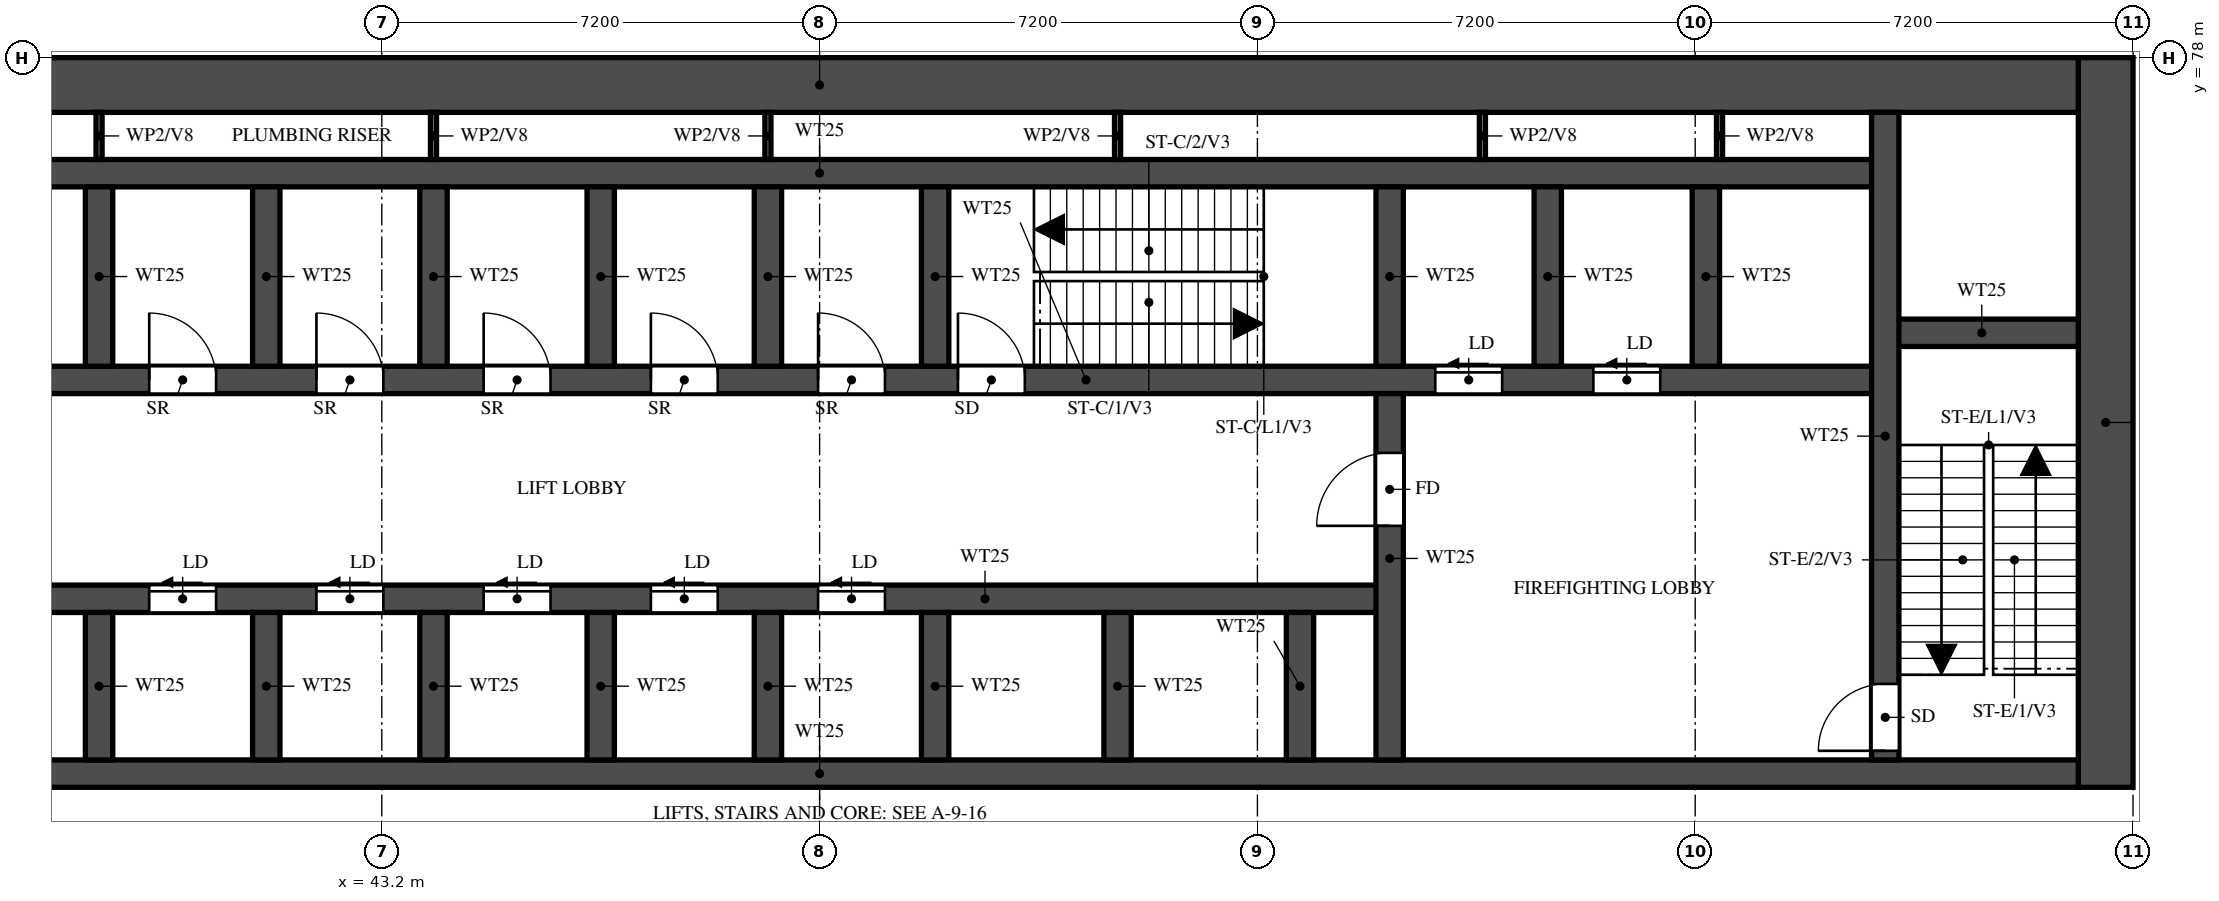
"""IFC4 building model, lengths in metres.
Left out: names, types, materials, properties, quantities, classifications, styles, units other than length and angle.
Written with IfcOpenShell. Run it as: python <this file> out.ifc"""

import sys

from ifc_helpers import new_model, si_unit, direction, frame, frame_2d, origin, place, context, subcontext, project, spatial, rectangle, extrude, element, fill, save


model = new_model("IFC4")
c1 = context("Model", 3, precision=1e-05, world=origin(), true_north=direction((0.0, 1.0)))
c2 = subcontext(c1, "Body", "Model", "MODEL_VIEW")
j1 = project(units=[si_unit("LENGTHUNIT", "METRE"), si_unit("PLANEANGLEUNIT", "RADIAN")], contexts=[c1])
p1 = place(None, origin())
s1 = spatial("IfcSite", under=j1, at=p1, CompositionType="ELEMENT")
p2 = place(p1, origin())
s2 = spatial("IfcBuilding", under=s1, at=p2, CompositionType="ELEMENT")
p3 = place(p2, frame((0.0, 0.0, 107.5)))
s3 = spatial("IfcBuildingStorey", under=s2, at=p3, CompositionType="ELEMENT", Elevation=107.5)
p4 = place(p3, frame((71.55, 66.0, 0.0), z_axis=(0.0, 0.0, 1.0), x_axis=(0.0, 1.0, 0.0)))
e1 = element("IfcWall", 1, at=p4, inside=s3, PredefinedType="SHEAR", context=c2, shape_type="SweptSolid", body=[
    extrude(rectangle(XDim=12.0, YDim=0.9, at=frame_2d((6.0, 0.0))), origin(), (0.0, 0.0, 1.0), 5.2),
])
p5 = place(p3, frame((29.7, 77.55, 0.0), z_axis=(0.0, 0.0, 1.0), x_axis=(1.0, 0.0, 0.0)))
e2 = element("IfcWall", 2, at=p5, inside=s3, PredefinedType="SHEAR", context=c2, shape_type="SweptSolid", body=[
    extrude(rectangle(XDim=41.4, YDim=0.9, at=frame_2d((20.7, 0.0))), origin(), (0.0, 0.0, 1.0), 5.2),
])
p6 = place(p3, frame((29.7, 66.225, 0.0), z_axis=(0.0, 0.0, 1.0), x_axis=(1.0, 0.0, 0.0)))
e3 = element("IfcWall", 3, at=p6, inside=s3, PredefinedType="SHEAR", context=c2, shape_type="SweptSolid", body=[
    extrude(rectangle(XDim=41.4, YDim=0.45, at=frame_2d((20.7, 0.0))), origin(), (0.0, 0.0, 1.0), 5.2),
])
p7 = place(p6, frame((0.925, 0.0, 0.0)))
e4 = element("IfcOpeningElement", 4, at=p7, cuts=e3, PredefinedType="OPENING", context=c2, shape_type="SweptSolid", body=[
    extrude(rectangle(XDim=1.1, YDim=2.1, at=frame_2d((0.55, 1.05))), frame((0.0, 0.235, 0.0), z_axis=(0.0, -1.0, 0.0), x_axis=(1.0, 0.0, 0.0)), (0.0, 0.0, 1.0), 0.47),
])
p8 = place(p6, frame((3.738, 0.0, 0.0)))
e5 = element("IfcOpeningElement", 5, at=p8, cuts=e3, PredefinedType="OPENING", context=c2, shape_type="SweptSolid", body=[
    extrude(rectangle(XDim=1.8, YDim=2.1, at=frame_2d((0.9, 1.05))), frame((0.0, 0.235, 0.0), z_axis=(0.0, -1.0, 0.0), x_axis=(1.0, 0.0, 0.0)), (0.0, 0.0, 1.0), 0.47),
])
p9 = place(p3, frame((35.575, 69.1, 0.0), z_axis=(0.0, 0.0, 1.0), x_axis=(1.0, 0.0, 0.0)))
e6 = element("IfcWall", 6, at=p9, inside=s3, PredefinedType="SHEAR", context=c2, shape_type="SweptSolid", body=[
    extrude(rectangle(XDim=24.2, YDim=0.45, at=frame_2d((12.1, 0.0))), origin(), (0.0, 0.0, 1.0), 5.2),
])
p10 = place(p9, frame((1.05, 0.0, 0.0)))
e7 = element("IfcOpeningElement", 7, at=p10, cuts=e6, PredefinedType="OPENING", context=c2, shape_type="SweptSolid", body=[
    extrude(rectangle(XDim=1.1, YDim=2.1, at=frame_2d((0.55, 1.05))), frame((0.0, 0.235, 0.0), z_axis=(0.0, -1.0, 0.0), x_axis=(1.0, 0.0, 0.0)), (0.0, 0.0, 1.0), 0.47),
])
p11 = place(p9, frame((3.8, 0.0, 0.0)))
e8 = element("IfcOpeningElement", 8, at=p11, cuts=e6, PredefinedType="OPENING", context=c2, shape_type="SweptSolid", body=[
    extrude(rectangle(XDim=1.1, YDim=2.1, at=frame_2d((0.55, 1.05))), frame((0.0, 0.235, 0.0), z_axis=(0.0, -1.0, 0.0), x_axis=(1.0, 0.0, 0.0)), (0.0, 0.0, 1.0), 0.47),
])
p12 = place(p9, frame((6.55, 0.0, 0.0)))
e9 = element("IfcOpeningElement", 9, at=p12, cuts=e6, PredefinedType="OPENING", context=c2, shape_type="SweptSolid", body=[
    extrude(rectangle(XDim=1.1, YDim=2.1, at=frame_2d((0.55, 1.05))), frame((0.0, 0.235, 0.0), z_axis=(0.0, -1.0, 0.0), x_axis=(1.0, 0.0, 0.0)), (0.0, 0.0, 1.0), 0.47),
])
p13 = place(p9, frame((9.3, 0.0, 0.0)))
e10 = element("IfcOpeningElement", 10, at=p13, cuts=e6, PredefinedType="OPENING", context=c2, shape_type="SweptSolid", body=[
    extrude(rectangle(XDim=1.1, YDim=2.1, at=frame_2d((0.55, 1.05))), frame((0.0, 0.235, 0.0), z_axis=(0.0, -1.0, 0.0), x_axis=(1.0, 0.0, 0.0)), (0.0, 0.0, 1.0), 0.47),
])
p14 = place(p9, frame((12.05, 0.0, 0.0)))
e11 = element("IfcOpeningElement", 11, at=p14, cuts=e6, PredefinedType="OPENING", context=c2, shape_type="SweptSolid", body=[
    extrude(rectangle(XDim=1.1, YDim=2.1, at=frame_2d((0.55, 1.05))), frame((0.0, 0.235, 0.0), z_axis=(0.0, -1.0, 0.0), x_axis=(1.0, 0.0, 0.0)), (0.0, 0.0, 1.0), 0.47),
])
p15 = place(p9, frame((14.8, 0.0, 0.0)))
e12 = element("IfcOpeningElement", 12, at=p15, cuts=e6, PredefinedType="OPENING", context=c2, shape_type="SweptSolid", body=[
    extrude(rectangle(XDim=1.1, YDim=2.1, at=frame_2d((0.55, 1.05))), frame((0.0, 0.235, 0.0), z_axis=(0.0, -1.0, 0.0), x_axis=(1.0, 0.0, 0.0)), (0.0, 0.0, 1.0), 0.47),
])
p16 = place(p3, frame((32.875, 72.7, 0.0), z_axis=(0.0, 0.0, 1.0), x_axis=(1.0, 0.0, 0.0)))
e13 = element("IfcWall", 13, at=p16, inside=s3, PredefinedType="SHEAR", context=c2, shape_type="SweptSolid", body=[
    extrude(rectangle(XDim=35.05, YDim=0.45, at=frame_2d((17.525, 0.0))), origin(), (0.0, 0.0, 1.0), 5.2),
])
p17 = place(p16, frame((19.8, 0.0, 0.0)))
e14 = element("IfcOpeningElement", 14, at=p17, cuts=e13, PredefinedType="OPENING", context=c2, shape_type="SweptSolid", body=[
    extrude(rectangle(XDim=1.1, YDim=2.1, at=frame_2d((0.55, 1.05))), frame((0.0, 0.235, 0.0), z_axis=(0.0, -1.0, 0.0), x_axis=(1.0, 0.0, 0.0)), (0.0, 0.0, 1.0), 0.47),
])
p18 = place(p16, frame((27.65, 0.0, 0.0)))
e15 = element("IfcOpeningElement", 15, at=p18, cuts=e13, PredefinedType="OPENING", context=c2, shape_type="SweptSolid", body=[
    extrude(rectangle(XDim=1.1, YDim=2.1, at=frame_2d((0.55, 1.05))), frame((0.0, 0.235, 0.0), z_axis=(0.0, -1.0, 0.0), x_axis=(1.0, 0.0, 0.0)), (0.0, 0.0, 1.0), 0.47),
])
p19 = place(p16, frame((30.25, 0.0, 0.0)))
e16 = element("IfcOpeningElement", 16, at=p19, cuts=e13, PredefinedType="OPENING", context=c2, shape_type="SweptSolid", body=[
    extrude(rectangle(XDim=1.1, YDim=2.1, at=frame_2d((0.55, 1.05))), frame((0.0, 0.235, 0.0), z_axis=(0.0, -1.0, 0.0), x_axis=(1.0, 0.0, 0.0)), (0.0, 0.0, 1.0), 0.47),
])
p20 = place(p16, frame((3.75, 0.0, 0.0)))
e17 = element("IfcOpeningElement", 17, at=p20, cuts=e13, PredefinedType="OPENING", context=c2, shape_type="SweptSolid", body=[
    extrude(rectangle(XDim=1.1, YDim=2.1, at=frame_2d((0.55, 1.05))), frame((0.0, 0.235, 0.0), z_axis=(0.0, -1.0, 0.0), x_axis=(1.0, 0.0, 0.0)), (0.0, 0.0, 1.0), 0.47),
])
p21 = place(p16, frame((6.5, 0.0, 0.0)))
e18 = element("IfcOpeningElement", 18, at=p21, cuts=e13, PredefinedType="OPENING", context=c2, shape_type="SweptSolid", body=[
    extrude(rectangle(XDim=1.1, YDim=2.1, at=frame_2d((0.55, 1.05))), frame((0.0, 0.235, 0.0), z_axis=(0.0, -1.0, 0.0), x_axis=(1.0, 0.0, 0.0)), (0.0, 0.0, 1.0), 0.47),
])
p22 = place(p16, frame((9.25, 0.0, 0.0)))
e19 = element("IfcOpeningElement", 19, at=p22, cuts=e13, PredefinedType="OPENING", context=c2, shape_type="SweptSolid", body=[
    extrude(rectangle(XDim=1.1, YDim=2.1, at=frame_2d((0.55, 1.05))), frame((0.0, 0.235, 0.0), z_axis=(0.0, -1.0, 0.0), x_axis=(1.0, 0.0, 0.0)), (0.0, 0.0, 1.0), 0.47),
])
p23 = place(p16, frame((12.0, 0.0, 0.0)))
e20 = element("IfcOpeningElement", 20, at=p23, cuts=e13, PredefinedType="OPENING", context=c2, shape_type="SweptSolid", body=[
    extrude(rectangle(XDim=1.1, YDim=2.1, at=frame_2d((0.55, 1.05))), frame((0.0, 0.235, 0.0), z_axis=(0.0, -1.0, 0.0), x_axis=(1.0, 0.0, 0.0)), (0.0, 0.0, 1.0), 0.47),
])
p24 = place(p16, frame((14.75, 0.0, 0.0)))
e21 = element("IfcOpeningElement", 21, at=p24, cuts=e13, PredefinedType="OPENING", context=c2, shape_type="SweptSolid", body=[
    extrude(rectangle(XDim=1.1, YDim=2.1, at=frame_2d((0.55, 1.05))), frame((0.0, 0.235, 0.0), z_axis=(0.0, -1.0, 0.0), x_axis=(1.0, 0.0, 0.0)), (0.0, 0.0, 1.0), 0.47),
])
p25 = place(p16, frame((17.5, 0.0, 0.0)))
e22 = element("IfcOpeningElement", 22, at=p25, cuts=e13, PredefinedType="OPENING", context=c2, shape_type="SweptSolid", body=[
    extrude(rectangle(XDim=1.1, YDim=2.1, at=frame_2d((0.55, 1.05))), frame((0.0, 0.235, 0.0), z_axis=(0.0, -1.0, 0.0), x_axis=(1.0, 0.0, 0.0)), (0.0, 0.0, 1.0), 0.47),
])
p26 = place(p16, frame((0.913, 0.0, 0.0)))
e23 = element("IfcOpeningElement", 23, at=p26, cuts=e13, PredefinedType="OPENING", context=c2, shape_type="SweptSolid", body=[
    extrude(rectangle(XDim=1.1, YDim=2.1, at=frame_2d((0.55, 1.05))), frame((0.0, 0.235, 0.0), z_axis=(0.0, -1.0, 0.0), x_axis=(1.0, 0.0, 0.0)), (0.0, 0.0, 1.0), 0.47),
])
p27 = place(p3, frame((32.875, 76.1, 0.0), z_axis=(0.0, 0.0, 1.0), x_axis=(1.0, 0.0, 0.0)))
e24 = element("IfcWall", 24, at=p27, inside=s3, PredefinedType="SHEAR", context=c2, shape_type="SweptSolid", body=[
    extrude(rectangle(XDim=35.05, YDim=0.45, at=frame_2d((17.525, 0.0))), origin(), (0.0, 0.0, 1.0), 5.2),
])
p28 = place(p3, frame((67.925, 73.475, 0.0), z_axis=(0.0, 0.0, 1.0), x_axis=(1.0, 0.0, 0.0)))
e25 = element("IfcWall", 25, at=p28, inside=s3, PredefinedType="SHEAR", context=c2, shape_type="SweptSolid", body=[
    extrude(rectangle(XDim=3.175, YDim=0.45, at=frame_2d((1.587, 0.0))), origin(), (0.0, 0.0, 1.0), 5.2),
])
p29 = place(p3, frame((67.925, 66.45, 0.0), z_axis=(0.0, 0.0, 1.0), x_axis=(0.0, 1.0, 0.0)))
e26 = element("IfcWall", 26, at=p29, inside=s3, PredefinedType="SHEAR", context=c2, shape_type="SweptSolid", body=[
    extrude(rectangle(XDim=10.65, YDim=0.45, at=frame_2d((5.325, 0.0))), origin(), (0.0, 0.0, 1.0), 5.2),
])
p30 = place(p29, frame((0.15, 0.0, 0.0)))
e27 = element("IfcOpeningElement", 27, at=p30, cuts=e26, PredefinedType="OPENING", context=c2, shape_type="SweptSolid", body=[
    extrude(rectangle(XDim=1.1, YDim=2.1, at=frame_2d((0.55, 1.05))), frame((0.0, 0.235, 0.0), z_axis=(0.0, -1.0, 0.0), x_axis=(1.0, 0.0, 0.0)), (0.0, 0.0, 1.0), 0.47),
])
p31 = place(p3, frame((59.775, 66.45, 0.0), z_axis=(0.0, 0.0, 1.0), x_axis=(0.0, 1.0, 0.0)))
e28 = element("IfcWall", 28, at=p31, inside=s3, PredefinedType="SHEAR", context=c2, shape_type="SweptSolid", body=[
    extrude(rectangle(XDim=6.025, YDim=0.45, at=frame_2d((3.013, 0.0))), origin(), (0.0, 0.0, 1.0), 5.2),
])
p32 = place(p31, frame((3.85, 0.0, 0.0)))
e29 = element("IfcOpeningElement", 29, at=p32, cuts=e28, PredefinedType="OPENING", context=c2, shape_type="SweptSolid", body=[
    extrude(rectangle(XDim=1.2, YDim=2.1, at=frame_2d((0.6, 1.05))), frame((0.0, 0.235, 0.0), z_axis=(0.0, -1.0, 0.0), x_axis=(1.0, 0.0, 0.0)), (0.0, 0.0, 1.0), 0.47),
])
p33 = place(p3, frame((59.775, 72.925, 0.0), z_axis=(0.0, 0.0, 1.0), x_axis=(0.0, 1.0, 0.0)))
e30 = element("IfcWall", 30, at=p33, inside=s3, PredefinedType="SHEAR", context=c2, shape_type="SweptSolid", body=[
    extrude(rectangle(XDim=2.95, YDim=0.45, at=frame_2d((1.475, 0.0))), origin(), (0.0, 0.0, 1.0), 5.2),
])
for number, where, z_axis, x_axis in (
    (31, (38.55, 66.45, 0.0), (0.0, 0.0, 1.0), (0.0, 1.0, 0.0)),
    (32, (41.3, 66.45, 0.0), (0.0, 0.0, 1.0), (0.0, 1.0, 0.0)),
    (33, (44.05, 66.45, 0.0), (0.0, 0.0, 1.0), (0.0, 1.0, 0.0)),
    (34, (46.8, 66.45, 0.0), (0.0, 0.0, 1.0), (0.0, 1.0, 0.0)),
    (35, (49.55, 66.45, 0.0), (0.0, 0.0, 1.0), (0.0, 1.0, 0.0)),
    (36, (52.3, 66.45, 0.0), (0.0, 0.0, 1.0), (0.0, 1.0, 0.0)),
    (37, (55.3, 66.45, 0.0), (0.0, 0.0, 1.0), (0.0, 1.0, 0.0)),
    (38, (58.3, 66.45, 0.0), (0.0, 0.0, 1.0), (0.0, 1.0, 0.0)),
):
    element("IfcWall", number, at=place(p3, frame(where, z_axis=z_axis, x_axis=x_axis)), inside=s3, PredefinedType="SHEAR", context=c2, shape_type="SweptSolid", body=[
        extrude(rectangle(XDim=2.425, YDim=0.45, at=frame_2d((1.212, 0.0))), origin(), (0.0, 0.0, 1.0), 5.2),
    ])
for number, where, z_axis, x_axis in (
    (39, (38.55, 72.925, 0.0), (0.0, 0.0, 1.0), (0.0, 1.0, 0.0)),
    (40, (41.3, 72.925, 0.0), (0.0, 0.0, 1.0), (0.0, 1.0, 0.0)),
    (41, (44.05, 72.925, 0.0), (0.0, 0.0, 1.0), (0.0, 1.0, 0.0)),
    (42, (46.8, 72.925, 0.0), (0.0, 0.0, 1.0), (0.0, 1.0, 0.0)),
    (43, (49.55, 72.925, 0.0), (0.0, 0.0, 1.0), (0.0, 1.0, 0.0)),
    (44, (52.3, 72.925, 0.0), (0.0, 0.0, 1.0), (0.0, 1.0, 0.0)),
    (45, (62.375, 72.925, 0.0), (0.0, 0.0, 1.0), (0.0, 1.0, 0.0)),
    (46, (64.975, 72.925, 0.0), (0.0, 0.0, 1.0), (0.0, 1.0, 0.0)),
):
    element("IfcWall", number, at=place(p3, frame(where, z_axis=z_axis, x_axis=x_axis)), inside=s3, PredefinedType="SHEAR", context=c2, shape_type="SweptSolid", body=[
        extrude(rectangle(XDim=2.95, YDim=0.45, at=frame_2d((1.475, 0.0))), origin(), (0.0, 0.0, 1.0), 5.2),
    ])
for number, where, z_axis, x_axis in (
    (47, (38.55, 76.325, 0.0), (0.0, 0.0, 1.0), (0.0, 1.0, 0.0)),
    (48, (44.05, 76.325, 0.0), (0.0, 0.0, 1.0), (0.0, 1.0, 0.0)),
    (49, (49.55, 76.325, 0.0), (0.0, 0.0, 1.0), (0.0, 1.0, 0.0)),
    (50, (55.3, 76.325, 0.0), (0.0, 0.0, 1.0), (0.0, 1.0, 0.0)),
    (51, (61.3, 76.325, 0.0), (0.0, 0.0, 1.0), (0.0, 1.0, 0.0)),
    (52, (65.2, 76.325, 0.0), (0.0, 0.0, 1.0), (0.0, 1.0, 0.0)),
):
    element("IfcWall", number, at=place(p3, frame(where, z_axis=z_axis, x_axis=x_axis)), inside=s3, PredefinedType="PARTITIONING", context=c2, shape_type="SweptSolid", body=[
        extrude(rectangle(XDim=0.775, YDim=0.1, at=frame_2d((0.388, 0.0))), origin(), (0.0, 0.0, 1.0), 5.2),
    ])
p34 = place(p17, origin())
e53 = element("IfcDoor", 53, at=p34, inside=s3, OperationType="SINGLE_SWING_LEFT", PredefinedType="DOOR", context=c2, shape_type="SweptSolid", body=[
    extrude(rectangle(XDim=1.1, YDim=2.1, at=frame_2d((0.55, 1.05))), frame((0.0, 0.025, 0.0), z_axis=(0.0, -1.0, 0.0), x_axis=(1.0, 0.0, 0.0)), (0.0, 0.0, 1.0), 0.05),
])
fill(e14, e53)
p35 = place(p30, origin())
e54 = element("IfcDoor", 54, at=p35, inside=s3, OperationType="SINGLE_SWING_LEFT", PredefinedType="DOOR", context=c2, shape_type="SweptSolid", body=[
    extrude(rectangle(XDim=1.1, YDim=2.1, at=frame_2d((0.55, 1.05))), frame((0.0, 0.025, 0.0), z_axis=(0.0, -1.0, 0.0), x_axis=(1.0, 0.0, 0.0)), (0.0, 0.0, 1.0), 0.05),
])
fill(e27, e54)
p36 = place(p32, origin())
e55 = element("IfcDoor", 55, at=p36, inside=s3, OperationType="SINGLE_SWING_RIGHT", PredefinedType="DOOR", context=c2, shape_type="SweptSolid", body=[
    extrude(rectangle(XDim=1.2, YDim=2.1, at=frame_2d((0.6, 1.05))), frame((0.0, 0.025, 0.0), z_axis=(0.0, -1.0, 0.0), x_axis=(1.0, 0.0, 0.0)), (0.0, 0.0, 1.0), 0.05),
])
fill(e29, e55)
p37 = place(p18, origin())
e56 = element("IfcDoor", 56, at=p37, inside=s3, OperationType="SLIDING_TO_LEFT", PredefinedType="DOOR", context=c2, shape_type="SweptSolid", body=[
    extrude(rectangle(XDim=1.1, YDim=2.1, at=frame_2d((0.55, 1.05))), frame((0.0, 0.025, 0.0), z_axis=(0.0, -1.0, 0.0), x_axis=(1.0, 0.0, 0.0)), (0.0, 0.0, 1.0), 0.05),
])
fill(e15, e56)
p38 = place(p19, origin())
e57 = element("IfcDoor", 57, at=p38, inside=s3, OperationType="SLIDING_TO_LEFT", PredefinedType="DOOR", context=c2, shape_type="SweptSolid", body=[
    extrude(rectangle(XDim=1.1, YDim=2.1, at=frame_2d((0.55, 1.05))), frame((0.0, 0.025, 0.0), z_axis=(0.0, -1.0, 0.0), x_axis=(1.0, 0.0, 0.0)), (0.0, 0.0, 1.0), 0.05),
])
fill(e16, e57)
p39 = place(p11, origin())
e58 = element("IfcDoor", 58, at=p39, inside=s3, OperationType="SLIDING_TO_LEFT", PredefinedType="DOOR", context=c2, shape_type="SweptSolid", body=[
    extrude(rectangle(XDim=1.1, YDim=2.1, at=frame_2d((0.55, 1.05))), frame((0.0, 0.025, 0.0), z_axis=(0.0, -1.0, 0.0), x_axis=(1.0, 0.0, 0.0)), (0.0, 0.0, 1.0), 0.05),
])
fill(e8, e58)
p40 = place(p12, origin())
e59 = element("IfcDoor", 59, at=p40, inside=s3, OperationType="SLIDING_TO_LEFT", PredefinedType="DOOR", context=c2, shape_type="SweptSolid", body=[
    extrude(rectangle(XDim=1.1, YDim=2.1, at=frame_2d((0.55, 1.05))), frame((0.0, 0.025, 0.0), z_axis=(0.0, -1.0, 0.0), x_axis=(1.0, 0.0, 0.0)), (0.0, 0.0, 1.0), 0.05),
])
fill(e9, e59)
p41 = place(p13, origin())
e60 = element("IfcDoor", 60, at=p41, inside=s3, OperationType="SLIDING_TO_LEFT", PredefinedType="DOOR", context=c2, shape_type="SweptSolid", body=[
    extrude(rectangle(XDim=1.1, YDim=2.1, at=frame_2d((0.55, 1.05))), frame((0.0, 0.025, 0.0), z_axis=(0.0, -1.0, 0.0), x_axis=(1.0, 0.0, 0.0)), (0.0, 0.0, 1.0), 0.05),
])
fill(e10, e60)
p42 = place(p14, origin())
e61 = element("IfcDoor", 61, at=p42, inside=s3, OperationType="SLIDING_TO_LEFT", PredefinedType="DOOR", context=c2, shape_type="SweptSolid", body=[
    extrude(rectangle(XDim=1.1, YDim=2.1, at=frame_2d((0.55, 1.05))), frame((0.0, 0.025, 0.0), z_axis=(0.0, -1.0, 0.0), x_axis=(1.0, 0.0, 0.0)), (0.0, 0.0, 1.0), 0.05),
])
fill(e11, e61)
p43 = place(p15, origin())
e62 = element("IfcDoor", 62, at=p43, inside=s3, OperationType="SLIDING_TO_LEFT", PredefinedType="DOOR", context=c2, shape_type="SweptSolid", body=[
    extrude(rectangle(XDim=1.1, YDim=2.1, at=frame_2d((0.55, 1.05))), frame((0.0, 0.025, 0.0), z_axis=(0.0, -1.0, 0.0), x_axis=(1.0, 0.0, 0.0)), (0.0, 0.0, 1.0), 0.05),
])
fill(e12, e62)
p44 = place(p21, origin())
e63 = element("IfcDoor", 63, at=p44, inside=s3, OperationType="SINGLE_SWING_LEFT", PredefinedType="DOOR", context=c2, shape_type="SweptSolid", body=[
    extrude(rectangle(XDim=1.1, YDim=2.1, at=frame_2d((0.55, 1.05))), frame((0.0, 0.025, 0.0), z_axis=(0.0, -1.0, 0.0), x_axis=(1.0, 0.0, 0.0)), (0.0, 0.0, 1.0), 0.05),
])
fill(e18, e63)
p45 = place(p22, origin())
e64 = element("IfcDoor", 64, at=p45, inside=s3, OperationType="SINGLE_SWING_LEFT", PredefinedType="DOOR", context=c2, shape_type="SweptSolid", body=[
    extrude(rectangle(XDim=1.1, YDim=2.1, at=frame_2d((0.55, 1.05))), frame((0.0, 0.025, 0.0), z_axis=(0.0, -1.0, 0.0), x_axis=(1.0, 0.0, 0.0)), (0.0, 0.0, 1.0), 0.05),
])
fill(e19, e64)
p46 = place(p23, origin())
e65 = element("IfcDoor", 65, at=p46, inside=s3, OperationType="SINGLE_SWING_LEFT", PredefinedType="DOOR", context=c2, shape_type="SweptSolid", body=[
    extrude(rectangle(XDim=1.1, YDim=2.1, at=frame_2d((0.55, 1.05))), frame((0.0, 0.025, 0.0), z_axis=(0.0, -1.0, 0.0), x_axis=(1.0, 0.0, 0.0)), (0.0, 0.0, 1.0), 0.05),
])
fill(e20, e65)
p47 = place(p24, origin())
e66 = element("IfcDoor", 66, at=p47, inside=s3, OperationType="SINGLE_SWING_LEFT", PredefinedType="DOOR", context=c2, shape_type="SweptSolid", body=[
    extrude(rectangle(XDim=1.1, YDim=2.1, at=frame_2d((0.55, 1.05))), frame((0.0, 0.025, 0.0), z_axis=(0.0, -1.0, 0.0), x_axis=(1.0, 0.0, 0.0)), (0.0, 0.0, 1.0), 0.05),
])
fill(e21, e66)
p48 = place(p25, origin())
e67 = element("IfcDoor", 67, at=p48, inside=s3, OperationType="SINGLE_SWING_LEFT", PredefinedType="DOOR", context=c2, shape_type="SweptSolid", body=[
    extrude(rectangle(XDim=1.1, YDim=2.1, at=frame_2d((0.55, 1.05))), frame((0.0, 0.025, 0.0), z_axis=(0.0, -1.0, 0.0), x_axis=(1.0, 0.0, 0.0)), (0.0, 0.0, 1.0), 0.05),
])
fill(e22, e67)
save(model, sys.argv[1])
